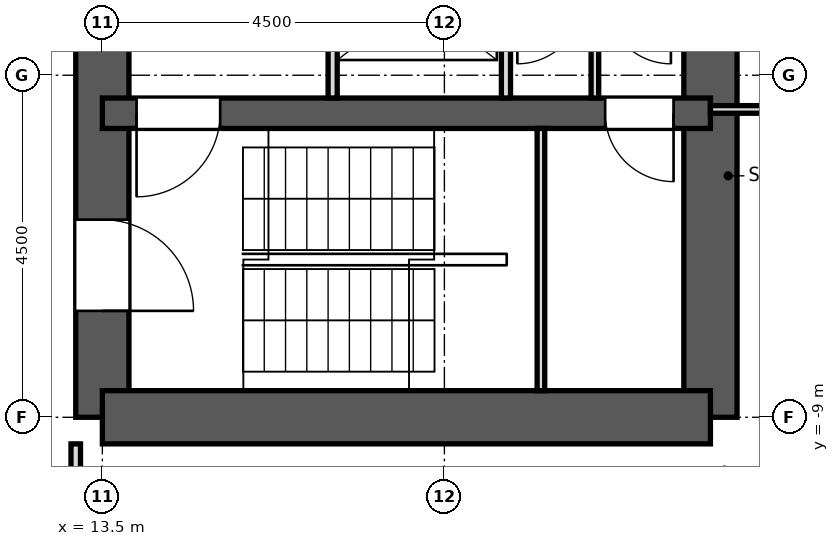
"""IFC4 building model, lengths in metres.
Left out: names, types, materials, properties, quantities, classifications, styles, units other than length and angle.
Written with IfcOpenShell. Run it as: python <this file> out.ifc"""

import sys

from ifc_helpers import new_model, si_unit, direction, frame, frame_2d, origin, place, context, subcontext, project, spatial, rectangle, extrude, element, fill, save


model = new_model("IFC4")
c1 = context("Model", 3, precision=1e-05, world=origin(), true_north=direction((0.0, 1.0)))
c2 = subcontext(c1, "Body", "Model", "MODEL_VIEW")
j1 = project(units=[si_unit("LENGTHUNIT", "METRE"), si_unit("PLANEANGLEUNIT", "RADIAN")], contexts=[c1])
p1 = place(None, origin())
s1 = spatial("IfcSite", under=j1, at=p1, CompositionType="ELEMENT")
p2 = place(p1, origin())
s2 = spatial("IfcBuilding", under=s1, at=p2, CompositionType="ELEMENT")
p3 = place(p2, frame((0.0, 0.0, 180.6)))
s3 = spatial("IfcBuildingStorey", under=s2, at=p3, CompositionType="ELEMENT", Elevation=180.6)
p4 = place(p3, frame((13.5, -9.0, 0.0), z_axis=(0.0, 0.0, 1.0), x_axis=(0.0, 1.0, 0.0)))
e1 = element("IfcWall", 1, at=p4, inside=s3, PredefinedType="SHEAR", context=c2, shape_type="SweptSolid", body=[
    extrude(rectangle(XDim=18.0, YDim=0.7, at=frame_2d((9.0, 0.0))), origin(), (0.0, 0.0, 1.0), 3.3),
])
p5 = place(p4, frame((15.4, 0.0, 0.0)))
e2 = element("IfcOpeningElement", 2, at=p5, cuts=e1, PredefinedType="OPENING", context=c2, shape_type="SweptSolid", body=[
    extrude(rectangle(XDim=1.2, YDim=2.1, at=frame_2d((0.6, 1.05))), frame((0.0, 0.362, 0.0), z_axis=(0.0, -1.0, 0.0), x_axis=(1.0, 0.0, 0.0)), (0.0, 0.0, 1.0), 0.724),
])
p6 = place(p4, frame((1.4, 0.0, 0.0)))
e3 = element("IfcOpeningElement", 3, at=p6, cuts=e1, PredefinedType="OPENING", context=c2, shape_type="SweptSolid", body=[
    extrude(rectangle(XDim=1.2, YDim=2.1, at=frame_2d((0.6, 1.05))), frame((0.0, 0.362, 0.0), z_axis=(0.0, -1.0, 0.0), x_axis=(1.0, 0.0, 0.0)), (0.0, 0.0, 1.0), 0.724),
])
p7 = place(p4, frame((7.5, 0.0, 0.0)))
e4 = element("IfcOpeningElement", 4, at=p7, cuts=e1, PredefinedType="OPENING", context=c2, shape_type="SweptSolid", body=[
    extrude(rectangle(XDim=3.0, YDim=2.4, at=frame_2d((1.5, 1.2))), frame((0.0, 0.362, 0.0), z_axis=(0.0, -1.0, 0.0), x_axis=(1.0, 0.0, 0.0)), (0.0, 0.0, 1.0), 0.724),
])
p8 = place(p3, frame((21.5, -9.0, 0.0), z_axis=(0.0, 0.0, 1.0), x_axis=(0.0, 1.0, 0.0)))
e5 = element("IfcWall", 5, at=p8, inside=s3, PredefinedType="SHEAR", context=c2, shape_type="SweptSolid", body=[
    extrude(rectangle(XDim=18.0, YDim=0.7, at=frame_2d((9.0, 0.0))), origin(), (0.0, 0.0, 1.0), 3.3),
])
p9 = place(p8, frame((9.45, 0.0, 0.0)))
e6 = element("IfcOpeningElement", 6, at=p9, cuts=e5, PredefinedType="OPENING", context=c2, shape_type="SweptSolid", body=[
    extrude(rectangle(XDim=0.9, YDim=2.1, at=frame_2d((0.45, 1.05))), frame((0.0, 0.362, 0.0), z_axis=(0.0, -1.0, 0.0), x_axis=(1.0, 0.0, 0.0)), (0.0, 0.0, 1.0), 0.724),
])
p10 = place(p8, frame((7.65, 0.0, 0.0)))
e7 = element("IfcOpeningElement", 7, at=p10, cuts=e5, PredefinedType="OPENING", context=c2, shape_type="SweptSolid", body=[
    extrude(rectangle(XDim=0.9, YDim=2.1, at=frame_2d((0.45, 1.05))), frame((0.0, 0.362, 0.0), z_axis=(0.0, -1.0, 0.0), x_axis=(1.0, 0.0, 0.0)), (0.0, 0.0, 1.0), 0.724),
])
p11 = place(p3, frame((13.5, -9.0, 0.0), z_axis=(0.0, 0.0, 1.0), x_axis=(1.0, 0.0, 0.0)))
e8 = element("IfcWall", 8, at=p11, inside=s3, PredefinedType="SHEAR", context=c2, shape_type="SweptSolid", body=[
    extrude(rectangle(XDim=8.0, YDim=0.7, at=frame_2d((4.0, 0.0))), origin(), (0.0, 0.0, 1.0), 3.3),
])
p12 = place(p3, frame((13.5, -5.0, 0.0), z_axis=(0.0, 0.0, 1.0), x_axis=(1.0, 0.0, 0.0)))
e9 = element("IfcWall", 9, at=p12, inside=s3, PredefinedType="SHEAR", context=c2, shape_type="SweptSolid", body=[
    extrude(rectangle(XDim=8.0, YDim=0.4, at=frame_2d((4.0, 0.0))), origin(), (0.0, 0.0, 1.0), 3.3),
])
p13 = place(p12, frame((6.615, 0.0, 0.0)))
e10 = element("IfcOpeningElement", 10, at=p13, cuts=e9, PredefinedType="OPENING", context=c2, shape_type="SweptSolid", body=[
    extrude(rectangle(XDim=0.9, YDim=2.1, at=frame_2d((0.45, 1.05))), frame((0.0, 0.212, 0.0), z_axis=(0.0, -1.0, 0.0), x_axis=(1.0, 0.0, 0.0)), (0.0, 0.0, 1.0), 0.424),
])
p14 = place(p12, frame((0.45, 0.0, 0.0)))
e11 = element("IfcOpeningElement", 11, at=p14, cuts=e9, PredefinedType="OPENING", context=c2, shape_type="SweptSolid", body=[
    extrude(rectangle(XDim=1.1, YDim=2.1, at=frame_2d((0.55, 1.05))), frame((0.0, 0.212, 0.0), z_axis=(0.0, -1.0, 0.0), x_axis=(1.0, 0.0, 0.0)), (0.0, 0.0, 1.0), 0.424),
])
p15 = place(p3, frame((13.15, -11.572, 0.0), z_axis=(0.0, 0.0, 1.0), x_axis=(0.0, 1.0, 0.0)))
e12 = element("IfcWall", 12, at=p15, inside=s3, PredefinedType="PARTITIONING", context=c2, shape_type="SweptSolid", body=[
    extrude(rectangle(XDim=2.221, YDim=0.125, at=frame_2d((1.111, 0.0))), origin(), (0.0, 0.0, 1.0), 2.85),
])
p16 = place(p3, frame((21.5, -4.95, 0.0), z_axis=(0.0, 0.0, 1.0), x_axis=(1.0, 0.0, 0.0)))
e13 = element("IfcWall", 13, at=p16, inside=s3, PredefinedType="PARTITIONING", context=c2, shape_type="SweptSolid", body=[
    extrude(rectangle(XDim=2.307, YDim=0.1, at=frame_2d((1.153, 0.0))), origin(), (0.0, 0.0, 1.0), 2.85),
])
p17 = place(p3, frame((16.53, -4.8, 0.0), z_axis=(0.0, 0.0, 1.0), x_axis=(0.0, 1.0, 0.0)))
e14 = element("IfcWall", 14, at=p17, inside=s3, PredefinedType="PARTITIONING", context=c2, shape_type="SweptSolid", body=[
    extrude(rectangle(XDim=2.6, YDim=0.12, at=frame_2d((1.3, 0.0))), origin(), (0.0, 0.0, 1.0), 2.85),
])
p18 = place(p17, frame((0.75, 0.0, 0.0)))
e15 = element("IfcOpeningElement", 15, at=p18, cuts=e14, PredefinedType="OPENING", context=c2, shape_type="SweptSolid", body=[
    extrude(rectangle(XDim=1.1, YDim=2.1, at=frame_2d((0.55, 1.05))), frame((0.0, 0.072, 0.0), z_axis=(0.0, -1.0, 0.0), x_axis=(1.0, 0.0, 0.0)), (0.0, 0.0, 1.0), 0.144),
])
p19 = place(p3, frame((18.81, -4.8, 0.0), z_axis=(0.0, 0.0, 1.0), x_axis=(0.0, 1.0, 0.0)))
e16 = element("IfcWall", 16, at=p19, inside=s3, PredefinedType="PARTITIONING", context=c2, shape_type="SweptSolid", body=[
    extrude(rectangle(XDim=2.6, YDim=0.12, at=frame_2d((1.3, 0.0))), origin(), (0.0, 0.0, 1.0), 2.85),
])
p20 = place(p3, frame((19.98, -4.8, 0.0), z_axis=(0.0, 0.0, 1.0), x_axis=(0.0, 1.0, 0.0)))
e17 = element("IfcWall", 17, at=p20, inside=s3, PredefinedType="PARTITIONING", context=c2, shape_type="SweptSolid", body=[
    extrude(rectangle(XDim=2.6, YDim=0.1, at=frame_2d((1.3, 0.0))), origin(), (0.0, 0.0, 1.0), 2.85),
])
p21 = place(p3, frame((19.27, -8.65, 0.0), z_axis=(0.0, 0.0, 1.0), x_axis=(0.0, 1.0, 0.0)))
e18 = element("IfcWall", 18, at=p21, inside=s3, PredefinedType="PARTITIONING", context=c2, shape_type="SweptSolid", body=[
    extrude(rectangle(XDim=3.45, YDim=0.1, at=frame_2d((1.725, 0.0))), origin(), (0.0, 0.0, 1.0), 2.85),
])
p22 = place(p13, frame((0.9, 0.0, 0.0), z_axis=(0.0, 0.0, 1.0), x_axis=(-1.0, 0.0, 0.0)))
e19 = element("IfcDoor", 19, at=p22, inside=s3, OperationType="SINGLE_SWING_LEFT", PredefinedType="DOOR", context=c2, shape_type="SweptSolid", body=[
    extrude(rectangle(XDim=0.9, YDim=2.1, at=frame_2d((0.45, 1.05))), frame((0.0, 0.025, 0.0), z_axis=(0.0, -1.0, 0.0), x_axis=(1.0, 0.0, 0.0)), (0.0, 0.0, 1.0), 0.05),
])
fill(e10, e19)
p23 = place(p14, frame((1.1, 0.0, 0.0), z_axis=(0.0, 0.0, 1.0), x_axis=(-1.0, 0.0, 0.0)))
e20 = element("IfcDoor", 20, at=p23, inside=s3, OperationType="SINGLE_SWING_RIGHT", PredefinedType="DOOR", context=c2, shape_type="SweptSolid", body=[
    extrude(rectangle(XDim=1.1, YDim=2.1, at=frame_2d((0.55, 1.05))), frame((0.0, 0.025, 0.0), z_axis=(0.0, -1.0, 0.0), x_axis=(1.0, 0.0, 0.0)), (0.0, 0.0, 1.0), 0.05),
])
fill(e11, e20)
p24 = place(p6, frame((1.2, 0.0, 0.0), z_axis=(0.0, 0.0, 1.0), x_axis=(-1.0, 0.0, 0.0)))
e21 = element("IfcDoor", 21, at=p24, inside=s3, OperationType="SINGLE_SWING_RIGHT", PredefinedType="DOOR", context=c2, shape_type="SweptSolid", body=[
    extrude(rectangle(XDim=1.2, YDim=2.1, at=frame_2d((0.6, 1.05))), frame((0.0, 0.025, 0.0), z_axis=(0.0, -1.0, 0.0), x_axis=(1.0, 0.0, 0.0)), (0.0, 0.0, 1.0), 0.05),
])
fill(e3, e21)
save(model, sys.argv[1])
